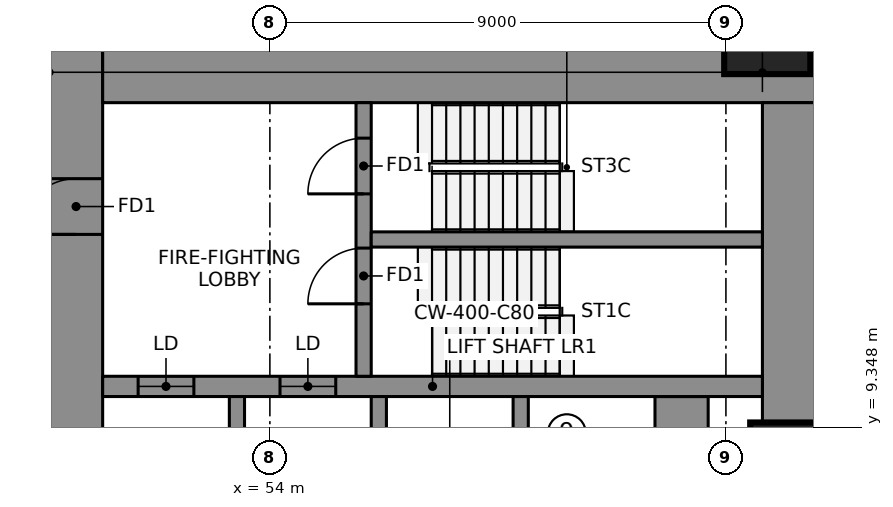
"""IFC4 building model, lengths in metres.
Left out: names, types, materials, properties, quantities, classifications, styles, units other than length and angle.
Written with IfcOpenShell. Run it as: python <this file> out.ifc"""

import sys

from ifc_helpers import new_model, si_unit, direction, frame, frame_2d, origin, origin_2d, place, context, subcontext, project, spatial, rectangle, extrude, element, fill, save


model = new_model("IFC4")
c1 = context("Model", 3, precision=1e-05, world=origin(), true_north=direction((0.0, 1.0)))
c2 = subcontext(c1, "Body", "Model", "MODEL_VIEW")
j1 = project(units=[si_unit("LENGTHUNIT", "METRE"), si_unit("PLANEANGLEUNIT", "RADIAN")], contexts=[c1])
p1 = place(None, origin())
s1 = spatial("IfcSite", under=j1, at=p1, CompositionType="ELEMENT")
p2 = place(p1, origin())
s2 = spatial("IfcBuilding", under=s1, at=p2, CompositionType="ELEMENT")
p3 = place(p2, frame((0.0, 0.0, 106.2)))
s3 = spatial("IfcBuildingStorey", under=s2, at=p3, CompositionType="ELEMENT", Elevation=106.2)
p4 = place(p3, frame((50.175, 6.65, 0.0), z_axis=(0.0, 0.0, 1.0), x_axis=(0.0, 1.0, 0.0)))
e1 = element("IfcWall", 1, at=p4, inside=s3, PredefinedType="SHEAR", context=c2, shape_type="SweptSolid", body=[
    extrude(rectangle(XDim=10.15, YDim=1.05, at=frame_2d((5.075, 0.0))), origin(), (0.0, 0.0, 1.0), 3.55),
])
p5 = place(p4, frame((6.5, 0.0, 0.0)))
e2 = element("IfcOpeningElement", 2, at=p5, cuts=e1, PredefinedType="OPENING", context=c2, shape_type="SweptSolid", body=[
    extrude(rectangle(XDim=1.1, YDim=2.1, at=frame_2d((0.55, 1.05))), frame((0.0, 0.535, 0.0), z_axis=(0.0, -1.0, 0.0), x_axis=(1.0, 0.0, 0.0)), (0.0, 0.0, 1.0), 1.07),
])
p6 = place(p3, frame((50.7, 16.275, 0.0), z_axis=(0.0, 0.0, 1.0), x_axis=(1.0, 0.0, 0.0)))
e3 = element("IfcWall", 3, at=p6, inside=s3, PredefinedType="SHEAR", context=c2, shape_type="SweptSolid", body=[
    extrude(rectangle(XDim=14.07, YDim=1.05, at=frame_2d((7.035, 0.0))), origin(), (0.0, 0.0, 1.0), 3.55),
])
p7 = place(p3, frame((64.245, 9.389, 0.0), z_axis=(0.0, 0.0, 1.0), x_axis=(0.0, 1.0, 0.0)))
e4 = element("IfcWall", 4, at=p7, inside=s3, PredefinedType="SHEAR", context=c2, shape_type="SweptSolid", body=[
    extrude(rectangle(XDim=6.361, YDim=1.05, at=frame_2d((3.181, 0.0))), origin(), (0.0, 0.0, 1.0), 3.55),
])
p8 = place(p3, frame((62.125, -9.95, 0.0), z_axis=(0.0, 0.0, 1.0), x_axis=(0.0, 1.0, 0.0)))
e5 = element("IfcWall", 5, at=p8, inside=s3, PredefinedType="SHEAR", context=c2, shape_type="SweptSolid", body=[
    extrude(rectangle(XDim=19.9, YDim=1.05, at=frame_2d((9.95, 0.0))), origin(), (0.0, 0.0, 1.0), 3.55),
])
p9 = place(p3, frame((50.7, 10.15, 0.0), z_axis=(0.0, 0.0, 1.0), x_axis=(1.0, 0.0, 0.0)))
e6 = element("IfcWall", 6, at=p9, inside=s3, PredefinedType="SHEAR", context=c2, shape_type="SweptSolid", body=[
    extrude(rectangle(XDim=13.02, YDim=0.4, at=frame_2d((6.51, 0.0))), origin(), (0.0, 0.0, 1.0), 3.55),
])
p10 = place(p9, frame((0.7, 0.0, 0.0)))
e7 = element("IfcOpeningElement", 7, at=p10, cuts=e6, PredefinedType="OPENING", context=c2, shape_type="SweptSolid", body=[
    extrude(rectangle(XDim=1.1, YDim=2.1, at=frame_2d((0.55, 1.05))), frame((0.0, 0.21, 0.0), z_axis=(0.0, -1.0, 0.0), x_axis=(1.0, 0.0, 0.0)), (0.0, 0.0, 1.0), 0.42),
])
p11 = place(p9, frame((3.5, 0.0, 0.0)))
e8 = element("IfcOpeningElement", 8, at=p11, cuts=e6, PredefinedType="OPENING", context=c2, shape_type="SweptSolid", body=[
    extrude(rectangle(XDim=1.1, YDim=2.1, at=frame_2d((0.55, 1.05))), frame((0.0, 0.21, 0.0), z_axis=(0.0, -1.0, 0.0), x_axis=(1.0, 0.0, 0.0)), (0.0, 0.0, 1.0), 0.42),
])
for number, where, z_axis, x_axis in (
    (9, (53.35, 6.95, 0.0), (0.0, 0.0, 1.0), (0.0, 1.0, 0.0)),
    (10, (56.15, 6.95, 0.0), (0.0, 0.0, 1.0), (0.0, 1.0, 0.0)),
    (11, (58.95, 6.95, 0.0), (0.0, 0.0, 1.0), (0.0, 1.0, 0.0)),
):
    element("IfcWall", number, at=place(p3, frame(where, z_axis=z_axis, x_axis=x_axis)), inside=s3, PredefinedType="SHEAR", context=c2, shape_type="SweptSolid", body=[
        extrude(rectangle(XDim=3.0, YDim=0.3, at=frame_2d((1.5, 0.0))), origin(), (0.0, 0.0, 1.0), 3.55),
    ])
p12 = place(p3, frame((55.85, 10.35, 0.0), z_axis=(0.0, 0.0, 1.0), x_axis=(0.0, 1.0, 0.0)))
e12 = element("IfcWall", 12, at=p12, inside=s3, PredefinedType="SHEAR", context=c2, shape_type="SweptSolid", body=[
    extrude(rectangle(XDim=5.4, YDim=0.3, at=frame_2d((2.7, 0.0))), origin(), (0.0, 0.0, 1.0), 3.55),
])
p13 = place(p12, frame((1.43, 0.0, 0.0)))
e13 = element("IfcOpeningElement", 13, at=p13, cuts=e12, PredefinedType="OPENING", context=c2, shape_type="SweptSolid", body=[
    extrude(rectangle(XDim=1.1, YDim=2.1, at=frame_2d((0.55, 1.05))), frame((0.0, 0.16, 0.0), z_axis=(0.0, -1.0, 0.0), x_axis=(1.0, 0.0, 0.0)), (0.0, 0.0, 1.0), 0.32),
])
p14 = place(p12, frame((3.6, 0.0, 0.0)))
e14 = element("IfcOpeningElement", 14, at=p14, cuts=e12, PredefinedType="OPENING", context=c2, shape_type="SweptSolid", body=[
    extrude(rectangle(XDim=1.1, YDim=2.1, at=frame_2d((0.55, 1.05))), frame((0.0, 0.16, 0.0), z_axis=(0.0, -1.0, 0.0), x_axis=(1.0, 0.0, 0.0)), (0.0, 0.0, 1.0), 0.32),
])
p15 = place(p3, frame((56.0, 13.05, 0.0), z_axis=(0.0, 0.0, 1.0), x_axis=(1.0, 0.0, 0.0)))
e15 = element("IfcWall", 15, at=p15, inside=s3, PredefinedType="SHEAR", context=c2, shape_type="SweptSolid", body=[
    extrude(rectangle(XDim=7.72, YDim=0.3, at=frame_2d((3.86, 0.0))), origin(), (0.0, 0.0, 1.0), 3.55),
])
for number, where, z_axis, x_axis in (
    (16, (64.329, 8.589, 0.0), (0.0, 0.0, 1.0), (1.0, 0.0, 0.0)),
    (17, (63.816, 17.164, 0.0), (0.0, 0.0, 1.0), (1.0, 0.0, 0.0)),
):
    element("IfcColumn", number, at=place(p3, frame(where, z_axis=z_axis, x_axis=x_axis)), inside=s3, PredefinedType="COLUMN", context=c2, shape_type="SweptSolid", body=[
        extrude(rectangle(XDim=1.7, YDim=1.7, at=origin_2d()), origin(), (0.0, 0.0, 1.0), 3.55),
    ])
p16 = place(p10, origin())
e18 = element("IfcDoor", 18, at=p16, inside=s3, OperationType="DOUBLE_DOOR_SLIDING", PredefinedType="DOOR", context=c2, shape_type="SweptSolid", body=[
    extrude(rectangle(XDim=1.1, YDim=2.1, at=frame_2d((0.55, 1.05))), frame((0.0, 0.025, 0.0), z_axis=(0.0, -1.0, 0.0), x_axis=(1.0, 0.0, 0.0)), (0.0, 0.0, 1.0), 0.05),
])
fill(e7, e18)
p17 = place(p11, origin())
e19 = element("IfcDoor", 19, at=p17, inside=s3, OperationType="DOUBLE_DOOR_SLIDING", PredefinedType="DOOR", context=c2, shape_type="SweptSolid", body=[
    extrude(rectangle(XDim=1.1, YDim=2.1, at=frame_2d((0.55, 1.05))), frame((0.0, 0.025, 0.0), z_axis=(0.0, -1.0, 0.0), x_axis=(1.0, 0.0, 0.0)), (0.0, 0.0, 1.0), 0.05),
])
fill(e8, e19)
p18 = place(p13, origin())
e20 = element("IfcDoor", 20, at=p18, inside=s3, OperationType="SINGLE_SWING_RIGHT", PredefinedType="DOOR", context=c2, shape_type="SweptSolid", body=[
    extrude(rectangle(XDim=1.1, YDim=2.1, at=frame_2d((0.55, 1.05))), frame((0.0, 0.025, 0.0), z_axis=(0.0, -1.0, 0.0), x_axis=(1.0, 0.0, 0.0)), (0.0, 0.0, 1.0), 0.05),
])
fill(e13, e20)
p19 = place(p14, origin())
e21 = element("IfcDoor", 21, at=p19, inside=s3, OperationType="SINGLE_SWING_RIGHT", PredefinedType="DOOR", context=c2, shape_type="SweptSolid", body=[
    extrude(rectangle(XDim=1.1, YDim=2.1, at=frame_2d((0.55, 1.05))), frame((0.0, 0.025, 0.0), z_axis=(0.0, -1.0, 0.0), x_axis=(1.0, 0.0, 0.0)), (0.0, 0.0, 1.0), 0.05),
])
fill(e14, e21)
p20 = place(p5, origin())
e22 = element("IfcDoor", 22, at=p20, inside=s3, OperationType="SINGLE_SWING_RIGHT", PredefinedType="DOOR", context=c2, shape_type="SweptSolid", body=[
    extrude(rectangle(XDim=1.1, YDim=2.1, at=frame_2d((0.55, 1.05))), frame((0.0, 0.025, 0.0), z_axis=(0.0, -1.0, 0.0), x_axis=(1.0, 0.0, 0.0)), (0.0, 0.0, 1.0), 0.05),
])
fill(e2, e22)
save(model, sys.argv[1])
